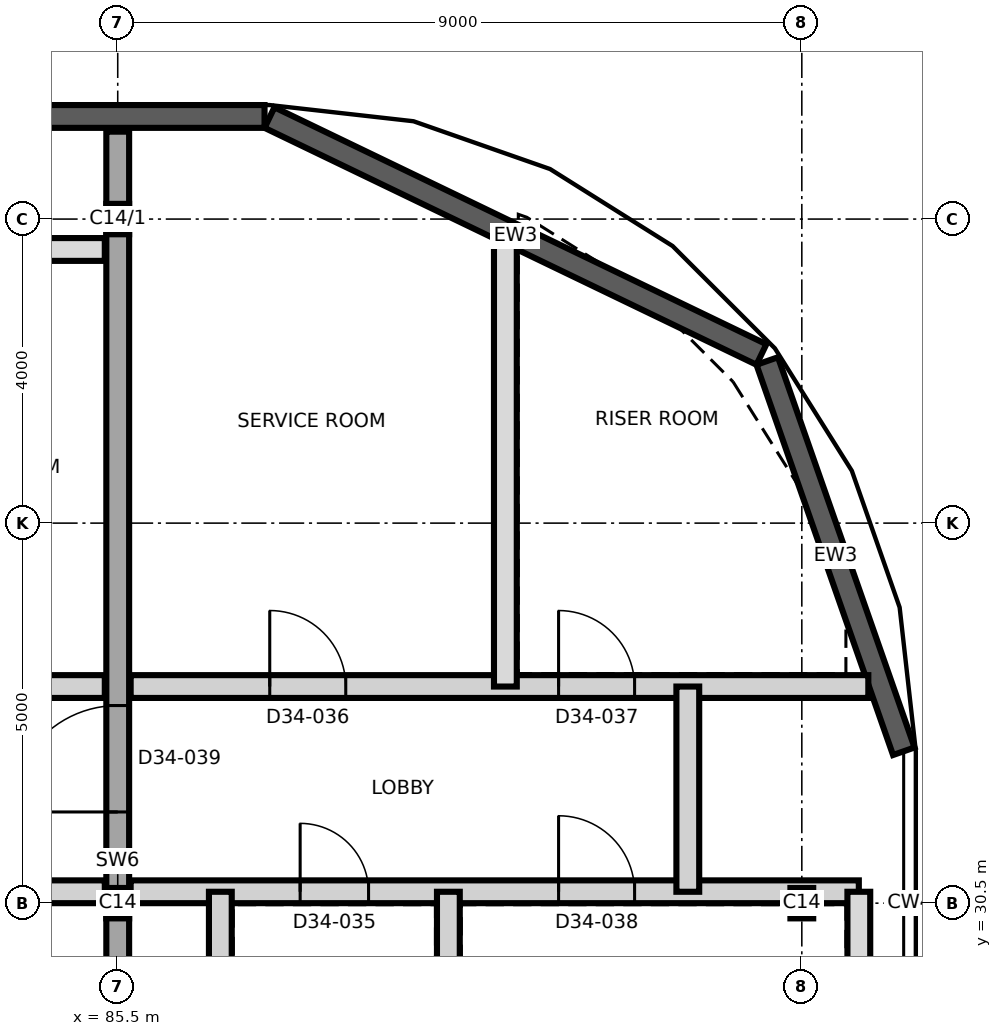
"""IFC4 building model, lengths in metres.
Left out: names, types, materials, properties, quantities, classifications, styles, units other than length and angle.
Written with IfcOpenShell. Run it as: python <this file> out.ifc"""

import sys

from ifc_helpers import new_model, si_unit, direction, frame, frame_2d, origin, origin_2d, place, context, subcontext, project, spatial, polyline, rectangle, i_section, outline, extrude, element, fill, save


model = new_model("IFC4")
c1 = context("Model", 3, precision=1e-05, world=origin(), true_north=direction((0.0, 1.0)))
c2 = subcontext(c1, "Body", "Model", "MODEL_VIEW")
j1 = project(units=[si_unit("LENGTHUNIT", "METRE"), si_unit("PLANEANGLEUNIT", "RADIAN")], contexts=[c1])
p1 = place(None, origin())
s1 = spatial("IfcSite", under=j1, at=p1, CompositionType="ELEMENT")
p2 = place(p1, origin())
s2 = spatial("IfcBuilding", under=s1, at=p2, CompositionType="ELEMENT")
p3 = place(p2, frame((0.0, 0.0, 281.3)))
s3 = spatial("IfcBuildingStorey", under=s2, at=p3, CompositionType="ELEMENT", Elevation=281.3)
p4 = place(p3, frame((85.5, 20.35, 0.0), z_axis=(0.0, 0.0, 1.0), x_axis=(0.0, 1.0, 0.0)))
e1 = element("IfcWall", 1, at=p4, inside=s3, PredefinedType="SHEAR", context=c2, shape_type="SweptSolid", body=[
    extrude(outline(polyline([(0.0, 0.0), (20.3, 0.0), (20.3, 1.508), (16.341, 4.2), (0.0, 4.2), (0.0, 0.0)])), frame((0.0, 0.15, 0.0), z_axis=(0.0, -1.0, 0.0), x_axis=(1.0, 0.0, 0.0)), (0.0, 0.0, 1.0), 0.3),
])
p5 = place(p4, frame((11.35, 0.0, 0.0)))
e2 = element("IfcOpeningElement", 2, at=p5, cuts=e1, PredefinedType="OPENING", context=c2, shape_type="SweptSolid", body=[
    extrude(rectangle(XDim=1.4, YDim=2.1, at=frame_2d((0.7, 1.05))), frame((0.0, 0.16, 0.0), z_axis=(0.0, -1.0, 0.0), x_axis=(1.0, 0.0, 0.0)), (0.0, 0.0, 1.0), 0.32),
])
p6 = place(p3, frame((85.5, 30.5, 0.0), z_axis=(0.0, 0.0, 1.0), x_axis=(1.0, 0.0, 0.0)))
e3 = element("IfcColumn", 3, at=p6, inside=s3, PredefinedType="COLUMN", context=c2, shape_type="SweptSolid", body=[
    extrude(i_section(OverallWidth=0.3, OverallDepth=0.4, WebThickness=0.013, FlangeThickness=0.024, FilletRadius=0.027, at=origin_2d()), origin(), (0.0, 0.0, 1.0), 4.2),
])
p7 = place(p3, frame((85.5, 39.5, 0.0), z_axis=(0.0, 0.0, 1.0), x_axis=(1.0, 0.0, 0.0)))
e4 = element("IfcColumn", 4, at=p7, inside=s3, PredefinedType="COLUMN", context=c2, shape_type="SweptSolid", body=[
    extrude(i_section(OverallWidth=0.3, OverallDepth=0.4, WebThickness=0.013, FlangeThickness=0.024, FilletRadius=0.027, at=origin_2d()), origin(), (0.0, 0.0, 1.0), 2.29),
])
p8 = place(p3, frame((94.5, 30.5, 0.0), z_axis=(0.0, 0.0, 1.0), x_axis=(1.0, 0.0, 0.0)))
e5 = element("IfcColumn", 5, at=p8, inside=s3, PredefinedType="COLUMN", context=c2, shape_type="SweptSolid", body=[
    extrude(i_section(OverallWidth=0.3, OverallDepth=0.4, WebThickness=0.013, FlangeThickness=0.024, FilletRadius=0.027, at=origin_2d()), origin(), (0.0, 0.0, 1.0), 4.2),
])
p9 = place(p3, frame((95.842, 32.499, 0.0), z_axis=(0.0, 0.0, 1.0), x_axis=(-0.330290447423, 0.943879346284, 0.0)))
e6 = element("IfcWall", 6, at=p9, inside=s3, PredefinedType="SOLIDWALL", context=c2, shape_type="SweptSolid", body=[
    extrude(outline(polyline([(0.0, 0.0), (5.439, 0.0), (5.439, 3.9), (3.626, 3.9), (1.813, 3.9), (0.0, 3.9), (0.0, 0.0)])), frame((0.0, 0.15, 0.0), z_axis=(0.0, -1.0, 0.0), x_axis=(1.0, 0.0, 0.0)), (0.0, 0.0, 1.0), 0.3),
])
p10 = place(p3, frame((93.969, 37.719, 0.0), z_axis=(0.0, 0.0, 1.0), x_axis=(-0.90096968593, 0.433882040461, 0.0)))
e7 = element("IfcWall", 7, at=p10, inside=s3, PredefinedType="SOLIDWALL", context=c2, shape_type="SweptSolid", body=[
    extrude(outline(polyline([(0.0, 0.0), (7.183, 0.0), (7.183, 2.332), (5.387, 2.862), (3.592, 3.392), (1.796, 3.9), (0.0, 3.9), (0.0, 0.0)])), frame((0.0, 0.15, 0.0), z_axis=(0.0, -1.0, 0.0), x_axis=(1.0, 0.0, 0.0)), (0.0, 0.0, 1.0), 0.3),
])
p11 = place(p3, frame((87.432, 40.85, 0.0), z_axis=(0.0, 0.0, 1.0), x_axis=(-1.0, 0.0, 0.0)))
e8 = element("IfcWall", 8, at=p11, inside=s3, PredefinedType="SOLIDWALL", context=c2, shape_type="SweptSolid", body=[
    extrude(outline(polyline([(0.0, 0.0), (47.417, 0.0), (47.417, 2.322), (47.417, 0.0), (45.887, 2.322), (44.358, 2.322), (42.828, 2.322), (41.299, 2.322), (39.769, 2.322), (38.239, 2.322), (36.71, 2.322), (35.18, 2.322), (33.651, 2.322), (32.121, 2.322), (30.592, 2.322), (29.062, 2.322), (27.532, 2.322), (26.003, 2.322), (24.473, 2.322), (22.944, 2.322), (21.414, 2.322), (19.885, 2.322), (18.355, 2.322), (16.825, 2.322), (15.296, 2.322), (13.766, 2.322), (12.237, 2.322), (10.707, 2.322), (9.177, 2.322), (7.648, 2.322), (6.118, 2.322), (4.589, 2.322), (3.059, 2.322), (1.53, 2.322), (0.0, 2.322), (0.0, 0.0)])), frame((0.0, 0.15, 0.0), z_axis=(0.0, -1.0, 0.0), x_axis=(1.0, 0.0, 0.0)), (0.0, 0.0, 1.0), 0.3),
])
p12 = place(p3, frame((58.55, 30.65, 0.0), z_axis=(0.0, 0.0, 1.0), x_axis=(1.0, 0.0, 0.0)))
e9 = element("IfcWall", 9, at=p12, inside=s3, PredefinedType="PARTITIONING", context=c2, shape_type="SweptSolid", body=[
    extrude(rectangle(XDim=26.78, YDim=0.3, at=frame_2d((13.39, 0.0))), origin(), (0.0, 0.0, 1.0), 3.9),
])
p13 = place(p12, frame((1.6, 0.0, 0.0)))
e10 = element("IfcOpeningElement", 10, at=p13, cuts=e9, PredefinedType="OPENING", context=c2, shape_type="SweptSolid", body=[
    extrude(rectangle(XDim=1.2, YDim=2.1, at=frame_2d((0.6, 1.05))), frame((0.0, 0.16, 0.0), z_axis=(0.0, -1.0, 0.0), x_axis=(1.0, 0.0, 0.0)), (0.0, 0.0, 1.0), 0.32),
])
p14 = place(p12, frame((6.1, 0.0, 0.0)))
e11 = element("IfcOpeningElement", 11, at=p14, cuts=e9, PredefinedType="OPENING", context=c2, shape_type="SweptSolid", body=[
    extrude(rectangle(XDim=1.2, YDim=2.1, at=frame_2d((0.6, 1.05))), frame((0.0, 0.16, 0.0), z_axis=(0.0, -1.0, 0.0), x_axis=(1.0, 0.0, 0.0)), (0.0, 0.0, 1.0), 0.32),
])
p15 = place(p12, frame((10.6, 0.0, 0.0)))
e12 = element("IfcOpeningElement", 12, at=p15, cuts=e9, PredefinedType="OPENING", context=c2, shape_type="SweptSolid", body=[
    extrude(rectangle(XDim=1.2, YDim=2.1, at=frame_2d((0.6, 1.05))), frame((0.0, 0.16, 0.0), z_axis=(0.0, -1.0, 0.0), x_axis=(1.0, 0.0, 0.0)), (0.0, 0.0, 1.0), 0.32),
])
p16 = place(p12, frame((15.1, 0.0, 0.0)))
e13 = element("IfcOpeningElement", 13, at=p16, cuts=e9, PredefinedType="OPENING", context=c2, shape_type="SweptSolid", body=[
    extrude(rectangle(XDim=1.2, YDim=2.1, at=frame_2d((0.6, 1.05))), frame((0.0, 0.16, 0.0), z_axis=(0.0, -1.0, 0.0), x_axis=(1.0, 0.0, 0.0)), (0.0, 0.0, 1.0), 0.32),
])
p17 = place(p12, frame((19.6, 0.0, 0.0)))
e14 = element("IfcOpeningElement", 14, at=p17, cuts=e9, PredefinedType="OPENING", context=c2, shape_type="SweptSolid", body=[
    extrude(rectangle(XDim=1.2, YDim=2.1, at=frame_2d((0.6, 1.05))), frame((0.0, 0.16, 0.0), z_axis=(0.0, -1.0, 0.0), x_axis=(1.0, 0.0, 0.0)), (0.0, 0.0, 1.0), 0.32),
])
p18 = place(p12, frame((24.1, 0.0, 0.0)))
e15 = element("IfcOpeningElement", 15, at=p18, cuts=e9, PredefinedType="OPENING", context=c2, shape_type="SweptSolid", body=[
    extrude(rectangle(XDim=1.2, YDim=2.1, at=frame_2d((0.6, 1.05))), frame((0.0, 0.16, 0.0), z_axis=(0.0, -1.0, 0.0), x_axis=(1.0, 0.0, 0.0)), (0.0, 0.0, 1.0), 0.32),
])
p19 = place(p3, frame((85.67, 30.65, 0.0), z_axis=(0.0, 0.0, 1.0), x_axis=(1.0, 0.0, 0.0)))
e16 = element("IfcWall", 16, at=p19, inside=s3, PredefinedType="PARTITIONING", context=c2, shape_type="SweptSolid", body=[
    extrude(rectangle(XDim=9.58, YDim=0.3, at=frame_2d((4.79, 0.0))), origin(), (0.0, 0.0, 1.0), 3.9),
])
p20 = place(p19, frame((2.23, 0.0, 0.0)))
e17 = element("IfcOpeningElement", 17, at=p20, cuts=e16, PredefinedType="OPENING", context=c2, shape_type="SweptSolid", body=[
    extrude(rectangle(XDim=0.9, YDim=2.1, at=frame_2d((0.45, 1.05))), frame((0.0, 0.16, 0.0), z_axis=(0.0, -1.0, 0.0), x_axis=(1.0, 0.0, 0.0)), (0.0, 0.0, 1.0), 0.32),
])
p21 = place(p19, frame((5.63, 0.0, 0.0)))
e18 = element("IfcOpeningElement", 18, at=p21, cuts=e16, PredefinedType="OPENING", context=c2, shape_type="SweptSolid", body=[
    extrude(rectangle(XDim=1.0, YDim=2.1, at=frame_2d((0.5, 1.05))), frame((0.0, 0.16, 0.0), z_axis=(0.0, -1.0, 0.0), x_axis=(1.0, 0.0, 0.0)), (0.0, 0.0, 1.0), 0.32),
])
p22 = place(p3, frame((58.55, 33.35, 0.0), z_axis=(0.0, 0.0, 1.0), x_axis=(1.0, 0.0, 0.0)))
e19 = element("IfcWall", 19, at=p22, inside=s3, PredefinedType="PARTITIONING", context=c2, shape_type="SweptSolid", body=[
    extrude(rectangle(XDim=26.78, YDim=0.3, at=frame_2d((13.39, 0.0))), origin(), (0.0, 0.0, 1.0), 3.9),
])
p23 = place(p22, frame((1.6, 0.0, 0.0)))
e20 = element("IfcOpeningElement", 20, at=p23, cuts=e19, PredefinedType="OPENING", context=c2, shape_type="SweptSolid", body=[
    extrude(rectangle(XDim=1.2, YDim=2.1, at=frame_2d((0.6, 1.05))), frame((0.0, 0.16, 0.0), z_axis=(0.0, -1.0, 0.0), x_axis=(1.0, 0.0, 0.0)), (0.0, 0.0, 1.0), 0.32),
])
p24 = place(p22, frame((6.1, 0.0, 0.0)))
e21 = element("IfcOpeningElement", 21, at=p24, cuts=e19, PredefinedType="OPENING", context=c2, shape_type="SweptSolid", body=[
    extrude(rectangle(XDim=1.2, YDim=2.1, at=frame_2d((0.6, 1.05))), frame((0.0, 0.16, 0.0), z_axis=(0.0, -1.0, 0.0), x_axis=(1.0, 0.0, 0.0)), (0.0, 0.0, 1.0), 0.32),
])
p25 = place(p22, frame((10.6, 0.0, 0.0)))
e22 = element("IfcOpeningElement", 22, at=p25, cuts=e19, PredefinedType="OPENING", context=c2, shape_type="SweptSolid", body=[
    extrude(rectangle(XDim=1.2, YDim=2.1, at=frame_2d((0.6, 1.05))), frame((0.0, 0.16, 0.0), z_axis=(0.0, -1.0, 0.0), x_axis=(1.0, 0.0, 0.0)), (0.0, 0.0, 1.0), 0.32),
])
p26 = place(p22, frame((15.1, 0.0, 0.0)))
e23 = element("IfcOpeningElement", 23, at=p26, cuts=e19, PredefinedType="OPENING", context=c2, shape_type="SweptSolid", body=[
    extrude(rectangle(XDim=1.2, YDim=2.1, at=frame_2d((0.6, 1.05))), frame((0.0, 0.16, 0.0), z_axis=(0.0, -1.0, 0.0), x_axis=(1.0, 0.0, 0.0)), (0.0, 0.0, 1.0), 0.32),
])
p27 = place(p22, frame((19.6, 0.0, 0.0)))
e24 = element("IfcOpeningElement", 24, at=p27, cuts=e19, PredefinedType="OPENING", context=c2, shape_type="SweptSolid", body=[
    extrude(rectangle(XDim=1.2, YDim=2.1, at=frame_2d((0.6, 1.05))), frame((0.0, 0.16, 0.0), z_axis=(0.0, -1.0, 0.0), x_axis=(1.0, 0.0, 0.0)), (0.0, 0.0, 1.0), 0.32),
])
p28 = place(p22, frame((24.1, 0.0, 0.0)))
e25 = element("IfcOpeningElement", 25, at=p28, cuts=e19, PredefinedType="OPENING", context=c2, shape_type="SweptSolid", body=[
    extrude(rectangle(XDim=1.2, YDim=2.1, at=frame_2d((0.6, 1.05))), frame((0.0, 0.16, 0.0), z_axis=(0.0, -1.0, 0.0), x_axis=(1.0, 0.0, 0.0)), (0.0, 0.0, 1.0), 0.32),
])
p29 = place(p3, frame((85.67, 33.35, 0.0), z_axis=(0.0, 0.0, 1.0), x_axis=(1.0, 0.0, 0.0)))
e26 = element("IfcWall", 26, at=p29, inside=s3, PredefinedType="PARTITIONING", context=c2, shape_type="SweptSolid", body=[
    extrude(rectangle(XDim=9.705, YDim=0.3, at=frame_2d((4.853, 0.0))), origin(), (0.0, 0.0, 1.0), 3.9),
])
p30 = place(p29, frame((1.83, 0.0, 0.0)))
e27 = element("IfcOpeningElement", 27, at=p30, cuts=e26, PredefinedType="OPENING", context=c2, shape_type="SweptSolid", body=[
    extrude(rectangle(XDim=1.0, YDim=2.1, at=frame_2d((0.5, 1.05))), frame((0.0, 0.16, 0.0), z_axis=(0.0, -1.0, 0.0), x_axis=(1.0, 0.0, 0.0)), (0.0, 0.0, 1.0), 0.32),
])
p31 = place(p29, frame((5.63, 0.0, 0.0)))
e28 = element("IfcOpeningElement", 28, at=p31, cuts=e26, PredefinedType="OPENING", context=c2, shape_type="SweptSolid", body=[
    extrude(rectangle(XDim=1.0, YDim=2.1, at=frame_2d((0.5, 1.05))), frame((0.0, 0.16, 0.0), z_axis=(0.0, -1.0, 0.0), x_axis=(1.0, 0.0, 0.0)), (0.0, 0.0, 1.0), 0.32),
])
p32 = place(p3, frame((58.55, 39.1, 0.0), z_axis=(0.0, 0.0, 1.0), x_axis=(1.0, 0.0, 0.0)))
e29 = element("IfcWall", 29, at=p32, inside=s3, PredefinedType="PARTITIONING", context=c2, shape_type="SweptSolid", body=[
    extrude(rectangle(XDim=26.78, YDim=0.3, at=frame_2d((13.39, 0.0))), origin(), (0.0, 0.0, 1.0), 3.85),
])
for number, where, z_axis, x_axis in (
    (30, (86.85, 21.8, 0.0), (0.0, 0.0, 1.0), (0.0, 1.0, 0.0)),
    (31, (89.85, 21.8, 0.0), (0.0, 0.0, 1.0), (0.0, 1.0, 0.0)),
):
    element("IfcWall", number, at=place(p3, frame(where, z_axis=z_axis, x_axis=x_axis)), inside=s3, PredefinedType="PARTITIONING", context=c2, shape_type="SweptSolid", body=[
        extrude(rectangle(XDim=8.85, YDim=0.3, at=frame_2d((4.425, 0.0))), origin(), (0.0, 0.0, 1.0), 3.9),
    ])
p33 = place(p3, frame((90.6, 33.35, 0.0), z_axis=(0.0, 0.0, 1.0), x_axis=(0.0, 1.0, 0.0)))
e32 = element("IfcWall", 32, at=p33, inside=s3, PredefinedType="PARTITIONING", context=c2, shape_type="SweptSolid", body=[
    extrude(rectangle(XDim=5.804, YDim=0.3, at=frame_2d((2.902, 0.0))), origin(), (0.0, 0.0, 1.0), 3.85),
])
p34 = place(p3, frame((93.0, 30.65, 0.0), z_axis=(0.0, 0.0, 1.0), x_axis=(0.0, 1.0, 0.0)))
e33 = element("IfcWall", 33, at=p34, inside=s3, PredefinedType="PARTITIONING", context=c2, shape_type="SweptSolid", body=[
    extrude(rectangle(XDim=2.7, YDim=0.3, at=frame_2d((1.35, 0.0))), origin(), (0.0, 0.0, 1.0), 3.9),
])
p35 = place(p3, frame((95.25, 25.387, 0.0), z_axis=(0.0, 0.0, 1.0), x_axis=(0.0, 1.0, 0.0)))
e34 = element("IfcWall", 34, at=p35, inside=s3, PredefinedType="PARTITIONING", context=c2, shape_type="SweptSolid", body=[
    extrude(rectangle(XDim=5.263, YDim=0.3, at=frame_2d((2.631, 0.0))), origin(), (0.0, 0.0, 1.0), 3.9),
])
p36 = place(p20, origin())
e35 = element("IfcDoor", 35, at=p36, inside=s3, OperationType="SINGLE_SWING_LEFT", PredefinedType="DOOR", context=c2, shape_type="SweptSolid", body=[
    extrude(rectangle(XDim=0.9, YDim=2.1, at=frame_2d((0.45, 1.05))), frame((0.0, 0.025, 0.0), z_axis=(0.0, -1.0, 0.0), x_axis=(1.0, 0.0, 0.0)), (0.0, 0.0, 1.0), 0.05),
])
fill(e17, e35)
p37 = place(p30, origin())
e36 = element("IfcDoor", 36, at=p37, inside=s3, OperationType="SINGLE_SWING_LEFT", PredefinedType="DOOR", context=c2, shape_type="SweptSolid", body=[
    extrude(rectangle(XDim=1.0, YDim=2.1, at=frame_2d((0.5, 1.05))), frame((0.0, 0.025, 0.0), z_axis=(0.0, -1.0, 0.0), x_axis=(1.0, 0.0, 0.0)), (0.0, 0.0, 1.0), 0.05),
])
fill(e27, e36)
p38 = place(p31, origin())
e37 = element("IfcDoor", 37, at=p38, inside=s3, OperationType="SINGLE_SWING_RIGHT", PredefinedType="DOOR", context=c2, shape_type="SweptSolid", body=[
    extrude(rectangle(XDim=1.0, YDim=2.1, at=frame_2d((0.5, 1.05))), frame((0.0, 0.025, 0.0), z_axis=(0.0, -1.0, 0.0), x_axis=(1.0, 0.0, 0.0)), (0.0, 0.0, 1.0), 0.05),
])
fill(e28, e37)
p39 = place(p21, origin())
e38 = element("IfcDoor", 38, at=p39, inside=s3, OperationType="SINGLE_SWING_LEFT", PredefinedType="DOOR", context=c2, shape_type="SweptSolid", body=[
    extrude(rectangle(XDim=1.0, YDim=2.1, at=frame_2d((0.5, 1.05))), frame((0.0, 0.025, 0.0), z_axis=(0.0, -1.0, 0.0), x_axis=(1.0, 0.0, 0.0)), (0.0, 0.0, 1.0), 0.05),
])
fill(e18, e38)
p40 = place(p5, origin())
e39 = element("IfcDoor", 39, at=p40, inside=s3, OperationType="SINGLE_SWING_RIGHT", PredefinedType="DOOR", context=c2, shape_type="SweptSolid", body=[
    extrude(rectangle(XDim=1.4, YDim=2.1, at=frame_2d((0.7, 1.05))), frame((0.0, 0.025, 0.0), z_axis=(0.0, -1.0, 0.0), x_axis=(1.0, 0.0, 0.0)), (0.0, 0.0, 1.0), 0.05),
])
fill(e2, e39)
save(model, sys.argv[1])
